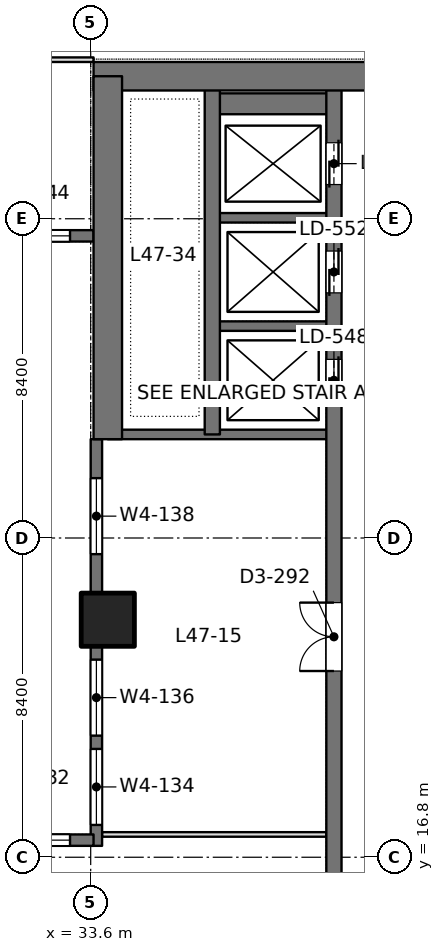
"""IFC4 building model, lengths in metres.
Left out: names, types, materials, properties, quantities, classifications, styles, units other than length and angle.
Written with IfcOpenShell. Run it as: python <this file> out.ifc"""

import sys

from ifc_helpers import new_model, si_unit, direction, frame, frame_2d, origin, origin_2d, place, context, subcontext, project, spatial, rectangle, extrude, element, fill, save


model = new_model("IFC4")
c1 = context("Model", 3, precision=1e-05, world=origin(), true_north=direction((0.0, 1.0)))
c2 = subcontext(c1, "Body", "Model", "MODEL_VIEW")
j1 = project(units=[si_unit("LENGTHUNIT", "METRE"), si_unit("PLANEANGLEUNIT", "RADIAN")], contexts=[c1])
p1 = place(None, origin())
s1 = spatial("IfcSite", under=j1, at=p1, CompositionType="ELEMENT")
p2 = place(p1, origin())
s2 = spatial("IfcBuilding", under=s1, at=p2, CompositionType="ELEMENT")
p3 = place(p2, frame((0.0, 0.0, 207.0)))
s3 = spatial("IfcBuildingStorey", under=s2, at=p3, CompositionType="ELEMENT", Elevation=207.0)
p4 = place(p3, frame((34.05, 23.05, 0.0), z_axis=(0.0, 0.0, 1.0), x_axis=(1.0, 0.0, 0.0)))
e1 = element("IfcColumn", 1, at=p4, inside=s3, PredefinedType="COLUMN", context=c2, shape_type="SweptSolid", body=[
    extrude(rectangle(XDim=1.4, YDim=1.4, at=origin_2d()), origin(), (0.0, 0.0, 1.0), 4.2),
])
p5 = place(p3, frame((33.675, 37.35, 0.0), z_axis=(0.0, 0.0, 1.0), x_axis=(1.0, 0.0, 0.0)))
e2 = element("IfcWall", 2, at=p5, inside=s3, PredefinedType="SHEAR", context=c2, shape_type="SweptSolid", body=[
    extrude(rectangle(XDim=17.85, YDim=0.75, at=frame_2d((8.925, 0.0))), origin(), (0.0, 0.0, 1.0), 4.2),
])
p6 = place(p5, frame((7.175, 0.0, 0.0)))
e3 = element("IfcOpeningElement", 3, at=p6, cuts=e2, PredefinedType="OPENING", context=c2, shape_type="SweptSolid", body=[
    extrude(rectangle(XDim=1.8, YDim=2.4, at=frame_2d((0.9, 1.2))), frame((0.0, 0.385, 0.0), z_axis=(0.0, -1.0, 0.0), x_axis=(1.0, 0.0, 0.0)), (0.0, 0.0, 1.0), 0.77),
])
p7 = place(p3, frame((34.05, 27.8, 0.0), z_axis=(0.0, 0.0, 1.0), x_axis=(0.0, 1.0, 0.0)))
e4 = element("IfcWall", 4, at=p7, inside=s3, PredefinedType="SHEAR", context=c2, shape_type="SweptSolid", body=[
    extrude(rectangle(XDim=9.55, YDim=0.75, at=frame_2d((4.775, 0.0))), origin(), (0.0, 0.0, 1.0), 4.2),
])
p8 = place(p3, frame((40.0, 13.05, 0.0), z_axis=(0.0, 0.0, 1.0), x_axis=(0.0, 1.0, 0.0)))
e5 = element("IfcWall", 5, at=p8, inside=s3, PredefinedType="SHEAR", context=c2, shape_type="SweptSolid", body=[
    extrude(rectangle(XDim=24.3, YDim=0.4, at=frame_2d((12.15, 0.0))), origin(), (0.0, 0.0, 1.0), 4.2),
])
p9 = place(p8, frame((15.75, 0.0, 0.0)))
e6 = element("IfcOpeningElement", 6, at=p9, cuts=e5, PredefinedType="OPENING", context=c2, shape_type="SweptSolid", body=[
    extrude(rectangle(XDim=1.1, YDim=2.2, at=frame_2d((0.55, 1.1))), frame((0.0, 0.21, 0.0), z_axis=(0.0, -1.0, 0.0), x_axis=(1.0, 0.0, 0.0)), (0.0, 0.0, 1.0), 0.42),
])
p10 = place(p8, frame((18.6, 0.0, 0.0)))
e7 = element("IfcOpeningElement", 7, at=p10, cuts=e5, PredefinedType="OPENING", context=c2, shape_type="SweptSolid", body=[
    extrude(rectangle(XDim=1.1, YDim=2.2, at=frame_2d((0.55, 1.1))), frame((0.0, 0.21, 0.0), z_axis=(0.0, -1.0, 0.0), x_axis=(1.0, 0.0, 0.0)), (0.0, 0.0, 1.0), 0.42),
])
p11 = place(p8, frame((21.45, 0.0, 0.0)))
e8 = element("IfcOpeningElement", 8, at=p11, cuts=e5, PredefinedType="OPENING", context=c2, shape_type="SweptSolid", body=[
    extrude(rectangle(XDim=1.1, YDim=2.2, at=frame_2d((0.55, 1.1))), frame((0.0, 0.21, 0.0), z_axis=(0.0, -1.0, 0.0), x_axis=(1.0, 0.0, 0.0)), (0.0, 0.0, 1.0), 0.42),
])
p12 = place(p8, frame((8.65, 0.0, 0.0)))
e9 = element("IfcOpeningElement", 9, at=p12, cuts=e5, PredefinedType="OPENING", context=c2, shape_type="SweptSolid", body=[
    extrude(rectangle(XDim=1.8, YDim=2.4, at=frame_2d((0.9, 1.2))), frame((0.0, 0.21, 0.0), z_axis=(0.0, -1.0, 0.0), x_axis=(1.0, 0.0, 0.0)), (0.0, 0.0, 1.0), 0.42),
])
p13 = place(p3, frame((36.8, 27.925, 0.0), z_axis=(0.0, 0.0, 1.0), x_axis=(0.0, 1.0, 0.0)))
e10 = element("IfcWall", 10, at=p13, inside=s3, PredefinedType="SHEAR", context=c2, shape_type="SweptSolid", body=[
    extrude(rectangle(XDim=9.425, YDim=0.4, at=frame_2d((4.712, 0.0))), origin(), (0.0, 0.0, 1.0), 4.2),
])
p14 = place(p3, frame((40.0, 27.925, 0.0), z_axis=(0.0, 0.0, 1.0), x_axis=(-1.0, 0.0, 0.0)))
e11 = element("IfcWall", 11, at=p14, inside=s3, PredefinedType="SHEAR", context=c2, shape_type="SweptSolid", body=[
    extrude(rectangle(XDim=5.95, YDim=0.25, at=frame_2d((2.975, 0.0))), origin(), (0.0, 0.0, 1.0), 4.2),
])
for number, where, z_axis, x_axis in (
    (12, (40.0, 30.775, 0.0), (0.0, 0.0, 1.0), (-1.0, 0.0, 0.0)),
    (13, (40.0, 33.625, 0.0), (0.0, 0.0, 1.0), (-1.0, 0.0, 0.0)),
):
    element("IfcWall", number, at=place(p3, frame(where, z_axis=z_axis, x_axis=x_axis)), inside=s3, PredefinedType="SHEAR", context=c2, shape_type="SweptSolid", body=[
        extrude(rectangle(XDim=3.2, YDim=0.25, at=frame_2d((1.6, 0.0))), origin(), (0.0, 0.0, 1.0), 4.2),
    ])
p15 = place(p3, frame((40.0, 36.625, 0.0), z_axis=(0.0, 0.0, 1.0), x_axis=(-1.0, 0.0, 0.0)))
e14 = element("IfcWall", 14, at=p15, inside=s3, PredefinedType="SHEAR", context=c2, shape_type="SweptSolid", body=[
    extrude(rectangle(XDim=3.2, YDim=0.55, at=frame_2d((1.6, 0.0))), origin(), (0.0, 0.0, 1.0), 4.2),
])
p16 = place(p3, frame((33.75, 17.1, 0.0), z_axis=(0.0, 0.0, 1.0), x_axis=(0.0, 1.0, 0.0)))
e15 = element("IfcWall", 15, at=p16, inside=s3, PredefinedType="SOLIDWALL", context=c2, shape_type="SweptSolid", body=[
    extrude(rectangle(XDim=10.7, YDim=0.3, at=frame_2d((5.35, 0.0))), origin(), (0.0, 0.0, 1.0), 4.05),
])
p17 = place(p16, frame((0.55, 0.0, 0.9)))
e16 = element("IfcOpeningElement", 16, at=p17, cuts=e15, PredefinedType="OPENING", context=c2, shape_type="SweptSolid", body=[
    extrude(rectangle(XDim=2.0, YDim=1.9, at=frame_2d((1.0, 0.95))), frame((0.0, 0.16, 0.0), z_axis=(0.0, -1.0, 0.0), x_axis=(1.0, 0.0, 0.0)), (0.0, 0.0, 1.0), 0.32),
])
p18 = place(p16, frame((2.9, 0.0, 0.9)))
e17 = element("IfcOpeningElement", 17, at=p18, cuts=e15, PredefinedType="OPENING", context=c2, shape_type="SweptSolid", body=[
    extrude(rectangle(XDim=2.0, YDim=1.9, at=frame_2d((1.0, 0.95))), frame((0.0, 0.16, 0.0), z_axis=(0.0, -1.0, 0.0), x_axis=(1.0, 0.0, 0.0)), (0.0, 0.0, 1.0), 0.32),
])
p19 = place(p16, frame((7.675, 0.0, 0.9)))
e18 = element("IfcOpeningElement", 18, at=p19, cuts=e15, PredefinedType="OPENING", context=c2, shape_type="SweptSolid", body=[
    extrude(rectangle(XDim=2.0, YDim=1.9, at=frame_2d((1.0, 0.95))), frame((0.0, 0.16, 0.0), z_axis=(0.0, -1.0, 0.0), x_axis=(1.0, 0.0, 0.0)), (0.0, 0.0, 1.0), 0.32),
])
p20 = place(p3, frame((25.75, 17.25, 0.0), z_axis=(0.0, 0.0, 1.0), x_axis=(1.0, 0.0, 0.0)))
e19 = element("IfcWall", 19, at=p20, inside=s3, PredefinedType="SOLIDWALL", context=c2, shape_type="SweptSolid", body=[
    extrude(rectangle(XDim=7.925, YDim=0.3, at=frame_2d((3.962, 0.0))), origin(), (0.0, 0.0, 1.0), 4.05),
])
p21 = place(p20, frame((0.069, 0.0, 0.9)))
e20 = element("IfcOpeningElement", 20, at=p21, cuts=e19, PredefinedType="OPENING", context=c2, shape_type="SweptSolid", body=[
    extrude(rectangle(XDim=2.0, YDim=1.9, at=frame_2d((1.0, 0.95))), frame((0.0, 0.16, 0.0), z_axis=(0.0, -1.0, 0.0), x_axis=(1.0, 0.0, 0.0)), (0.0, 0.0, 1.0), 0.32),
])
p22 = place(p20, frame((2.688, 0.0, 0.9)))
e21 = element("IfcOpeningElement", 21, at=p22, cuts=e19, PredefinedType="OPENING", context=c2, shape_type="SweptSolid", body=[
    extrude(rectangle(XDim=2.0, YDim=1.9, at=frame_2d((1.0, 0.95))), frame((0.0, 0.16, 0.0), z_axis=(0.0, -1.0, 0.0), x_axis=(1.0, 0.0, 0.0)), (0.0, 0.0, 1.0), 0.32),
])
p23 = place(p20, frame((5.306, 0.0, 0.9)))
e22 = element("IfcOpeningElement", 22, at=p23, cuts=e19, PredefinedType="OPENING", context=c2, shape_type="SweptSolid", body=[
    extrude(rectangle(XDim=2.0, YDim=1.9, at=frame_2d((1.0, 0.95))), frame((0.0, 0.16, 0.0), z_axis=(0.0, -1.0, 0.0), x_axis=(1.0, 0.0, 0.0)), (0.0, 0.0, 1.0), 0.32),
])
p24 = place(p3, frame((25.75, 33.15, 0.0), z_axis=(0.0, 0.0, 1.0), x_axis=(1.0, 0.0, 0.0)))
e23 = element("IfcWall", 23, at=p24, inside=s3, PredefinedType="SOLIDWALL", context=c2, shape_type="SweptSolid", body=[
    extrude(rectangle(XDim=7.925, YDim=0.3, at=frame_2d((3.962, 0.0))), origin(), (0.0, 0.0, 1.0), 4.05),
])
p25 = place(p24, frame((0.069, 0.0, 0.9)))
e24 = element("IfcOpeningElement", 24, at=p25, cuts=e23, PredefinedType="OPENING", context=c2, shape_type="SweptSolid", body=[
    extrude(rectangle(XDim=2.0, YDim=1.9, at=frame_2d((1.0, 0.95))), frame((0.0, 0.16, 0.0), z_axis=(0.0, -1.0, 0.0), x_axis=(1.0, 0.0, 0.0)), (0.0, 0.0, 1.0), 0.32),
])
p26 = place(p24, frame((2.688, 0.0, 0.9)))
e25 = element("IfcOpeningElement", 25, at=p26, cuts=e23, PredefinedType="OPENING", context=c2, shape_type="SweptSolid", body=[
    extrude(rectangle(XDim=2.0, YDim=1.9, at=frame_2d((1.0, 0.95))), frame((0.0, 0.16, 0.0), z_axis=(0.0, -1.0, 0.0), x_axis=(1.0, 0.0, 0.0)), (0.0, 0.0, 1.0), 0.32),
])
p27 = place(p24, frame((5.306, 0.0, 0.9)))
e26 = element("IfcOpeningElement", 26, at=p27, cuts=e23, PredefinedType="OPENING", context=c2, shape_type="SweptSolid", body=[
    extrude(rectangle(XDim=2.0, YDim=1.9, at=frame_2d((1.0, 0.95))), frame((0.0, 0.16, 0.0), z_axis=(0.0, -1.0, 0.0), x_axis=(1.0, 0.0, 0.0)), (0.0, 0.0, 1.0), 0.32),
])
p28 = place(p3, frame((33.898, 17.4, 0.0), z_axis=(0.0, 0.0, 1.0), x_axis=(1.0, 0.0, 0.0)))
e27 = element("IfcWall", 27, at=p28, inside=s3, PredefinedType="PARTITIONING", context=c2, shape_type="SweptSolid", body=[
    extrude(rectangle(XDim=5.904, YDim=0.12, at=frame_2d((2.952, 0.0))), origin(), (0.0, 0.0, 1.0), 3.55),
])
p29 = place(p3, frame((16.725, 37.785, 0.0), z_axis=(0.0, 0.0, 1.0), x_axis=(1.0, 0.0, 0.0)))
e28 = element("IfcWall", 28, at=p29, inside=s3, PredefinedType="PARTITIONING", context=c2, shape_type="SweptSolid", body=[
    extrude(rectangle(XDim=16.95, YDim=0.12, at=frame_2d((8.475, 0.0))), origin(), (0.0, 0.0, 1.0), 3.55),
])
p30 = place(p29, frame((7.575, 0.0, 0.0)))
e29 = element("IfcOpeningElement", 29, at=p30, cuts=e28, PredefinedType="OPENING", context=c2, shape_type="SweptSolid", body=[
    extrude(rectangle(XDim=1.8, YDim=2.2, at=frame_2d((0.9, 1.1))), frame((0.0, 0.07, 0.0), z_axis=(0.0, -1.0, 0.0), x_axis=(1.0, 0.0, 0.0)), (0.0, 0.0, 1.0), 0.14),
])
p31 = place(p17, origin())
e30 = element("IfcWindow", 30, at=p31, inside=s3, PartitioningType="SINGLE_PANEL", PredefinedType="WINDOW", context=c2, shape_type="SweptSolid", body=[
    extrude(rectangle(XDim=2.0, YDim=1.9, at=frame_2d((1.0, 0.95))), frame((0.0, 0.03, 0.0), z_axis=(0.0, -1.0, 0.0), x_axis=(1.0, 0.0, 0.0)), (0.0, 0.0, 1.0), 0.06),
])
fill(e16, e30)
p32 = place(p18, origin())
e31 = element("IfcWindow", 31, at=p32, inside=s3, PartitioningType="SINGLE_PANEL", PredefinedType="WINDOW", context=c2, shape_type="SweptSolid", body=[
    extrude(rectangle(XDim=2.0, YDim=1.9, at=frame_2d((1.0, 0.95))), frame((0.0, 0.03, 0.0), z_axis=(0.0, -1.0, 0.0), x_axis=(1.0, 0.0, 0.0)), (0.0, 0.0, 1.0), 0.06),
])
fill(e17, e31)
p33 = place(p19, origin())
e32 = element("IfcWindow", 32, at=p33, inside=s3, PartitioningType="SINGLE_PANEL", PredefinedType="WINDOW", context=c2, shape_type="SweptSolid", body=[
    extrude(rectangle(XDim=2.0, YDim=1.9, at=frame_2d((1.0, 0.95))), frame((0.0, 0.03, 0.0), z_axis=(0.0, -1.0, 0.0), x_axis=(1.0, 0.0, 0.0)), (0.0, 0.0, 1.0), 0.06),
])
fill(e18, e32)
p34 = place(p23, origin())
e33 = element("IfcWindow", 33, at=p34, inside=s3, PartitioningType="SINGLE_PANEL", PredefinedType="WINDOW", context=c2, shape_type="SweptSolid", body=[
    extrude(rectangle(XDim=2.0, YDim=1.9, at=frame_2d((1.0, 0.95))), frame((0.0, 0.03, 0.0), z_axis=(0.0, -1.0, 0.0), x_axis=(1.0, 0.0, 0.0)), (0.0, 0.0, 1.0), 0.06),
])
fill(e22, e33)
p35 = place(p27, origin())
e34 = element("IfcWindow", 34, at=p35, inside=s3, PartitioningType="SINGLE_PANEL", PredefinedType="WINDOW", context=c2, shape_type="SweptSolid", body=[
    extrude(rectangle(XDim=2.0, YDim=1.9, at=frame_2d((1.0, 0.95))), frame((0.0, 0.03, 0.0), z_axis=(0.0, -1.0, 0.0), x_axis=(1.0, 0.0, 0.0)), (0.0, 0.0, 1.0), 0.06),
])
fill(e26, e34)
p36 = place(p9, origin())
e35 = element("IfcDoor", 35, at=p36, inside=s3, OperationType="DOUBLE_DOOR_SLIDING", PredefinedType="DOOR", context=c2, shape_type="SweptSolid", body=[
    extrude(rectangle(XDim=1.1, YDim=2.2, at=frame_2d((0.55, 1.1))), frame((0.0, 0.025, 0.0), z_axis=(0.0, -1.0, 0.0), x_axis=(1.0, 0.0, 0.0)), (0.0, 0.0, 1.0), 0.05),
])
fill(e6, e35)
p37 = place(p10, origin())
e36 = element("IfcDoor", 36, at=p37, inside=s3, OperationType="DOUBLE_DOOR_SLIDING", PredefinedType="DOOR", context=c2, shape_type="SweptSolid", body=[
    extrude(rectangle(XDim=1.1, YDim=2.2, at=frame_2d((0.55, 1.1))), frame((0.0, 0.025, 0.0), z_axis=(0.0, -1.0, 0.0), x_axis=(1.0, 0.0, 0.0)), (0.0, 0.0, 1.0), 0.05),
])
fill(e7, e36)
p38 = place(p11, origin())
e37 = element("IfcDoor", 37, at=p38, inside=s3, OperationType="DOUBLE_DOOR_SLIDING", PredefinedType="DOOR", context=c2, shape_type="SweptSolid", body=[
    extrude(rectangle(XDim=1.1, YDim=2.2, at=frame_2d((0.55, 1.1))), frame((0.0, 0.025, 0.0), z_axis=(0.0, -1.0, 0.0), x_axis=(1.0, 0.0, 0.0)), (0.0, 0.0, 1.0), 0.05),
])
fill(e8, e37)
p39 = place(p12, origin())
e38 = element("IfcDoor", 38, at=p39, inside=s3, OperationType="DOUBLE_DOOR_SINGLE_SWING", PredefinedType="DOOR", context=c2, shape_type="SweptSolid", body=[
    extrude(rectangle(XDim=1.8, YDim=2.4, at=frame_2d((0.9, 1.2))), frame((0.0, 0.025, 0.0), z_axis=(0.0, -1.0, 0.0), x_axis=(1.0, 0.0, 0.0)), (0.0, 0.0, 1.0), 0.05),
])
fill(e9, e38)
save(model, sys.argv[1])
